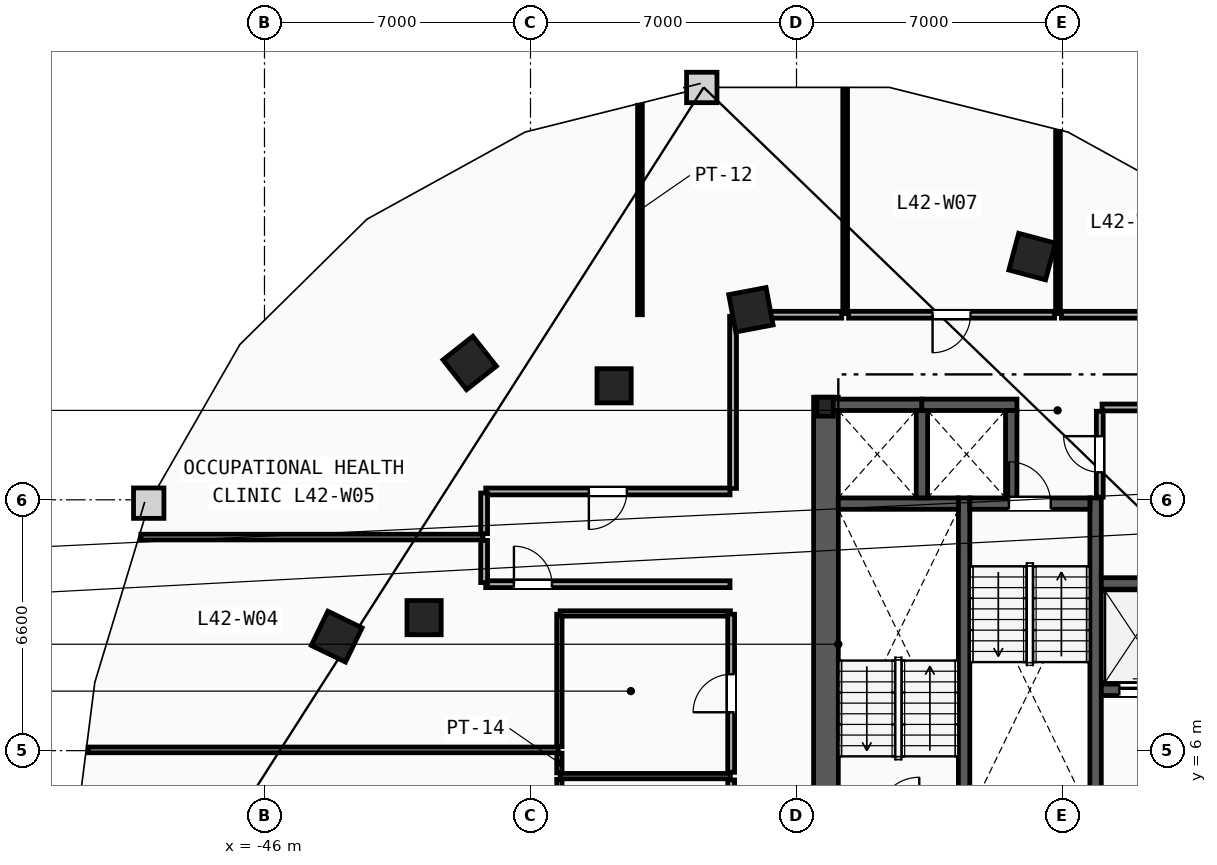
"""IFC4 building model, lengths in metres.
Left out: names, types, materials, properties, quantities, classifications, styles, units other than length and angle.
Written with IfcOpenShell. Run it as: python <this file> out.ifc"""

import sys

from ifc_helpers import new_model, si_unit, direction, frame, frame_2d, origin, origin_2d, place, context, subcontext, project, spatial, rectangle, i_section, extrude, element, fill, save


model = new_model("IFC4")
c1 = context("Model", 3, precision=1e-05, world=origin(), true_north=direction((0.0, 1.0)))
c2 = subcontext(c1, "Body", "Model", "MODEL_VIEW")
j1 = project(units=[si_unit("LENGTHUNIT", "METRE"), si_unit("PLANEANGLEUNIT", "RADIAN")], contexts=[c1])
p1 = place(None, origin())
s1 = spatial("IfcSite", under=j1, at=p1, CompositionType="ELEMENT")
p2 = place(p1, origin())
s2 = spatial("IfcBuilding", under=s1, at=p2, CompositionType="ELEMENT")
p3 = place(p2, frame((0.0, 0.0, 162.0)))
s3 = spatial("IfcBuildingStorey", under=s2, at=p3, CompositionType="ELEMENT", Elevation=162.0)
p4 = place(p3, frame((-31.25, 15.05, 0.0), z_axis=(0.0, 0.0, 1.0), x_axis=(1.0, 0.0, 0.0)))
e1 = element("IfcColumn", 1, at=p4, inside=s3, PredefinedType="COLUMN", context=c2, shape_type="SweptSolid", body=[
    extrude(i_section(OverallWidth=0.432, OverallDepth=0.498, WebThickness=0.056, FlangeThickness=0.089, FilletRadius=0.018, at=origin_2d()), origin(), (0.0, 0.0, 1.0), 3.6),
])
for number, where, z_axis, x_axis in (
    (2, (-41.8, 9.5, 0.0), (0.0, 0.0, 1.0), (1.0, 0.0, 0.0)),
    (3, (-36.8, 15.6, 0.0), (0.0, 0.0, 1.0), (1.0, 0.0, 0.0)),
):
    element("IfcColumn", number, at=place(p3, frame(where, z_axis=z_axis, x_axis=x_axis)), inside=s3, PredefinedType="COLUMN", context=c2, shape_type="SweptSolid", body=[
        extrude(rectangle(XDim=0.9, YDim=0.9, at=origin_2d()), origin(), (0.0, 0.0, 1.0), 3.6),
    ])
for number, where, z_axis, x_axis in (
    (4, (-25.8, 19.0, 0.0), (0.0, 0.0, 1.0), (-0.966, 0.259, 0.0)),
    (5, (-33.2, 17.6, 0.0), (0.0, 0.0, 1.0), (-0.983, -0.186, 0.0)),
    (6, (-40.6, 16.2, 0.0), (0.0, 0.0, 1.0), (-0.785, -0.619, 0.0)),
    (7, (-44.1, 9.0, 0.0), (0.0, 0.0, 1.0), (-0.437, -0.899, 0.0)),
):
    element("IfcColumn", number, at=place(p3, frame(where, z_axis=z_axis, x_axis=x_axis)), inside=s3, PredefinedType="COLUMN", context=c2, shape_type="SweptSolid", body=[
        extrude(rectangle(XDim=1.0, YDim=1.0, at=origin_2d()), origin(), (0.0, 0.0, 1.0), 3.6),
    ])
p5 = place(p3, frame((-31.225, 1.97, 0.0), z_axis=(0.0, 0.0, 1.0), x_axis=(0.0, 1.0, 0.0)))
e8 = element("IfcWall", 8, at=p5, inside=s3, PredefinedType="SHEAR", context=c2, shape_type="SweptSolid", body=[
    extrude(rectangle(XDim=13.33, YDim=0.65, at=frame_2d((6.665, 0.0))), origin(), (0.0, 0.0, 1.0), 3.36),
])
for number, where, z_axis, x_axis in (
    (9, (-27.59, 1.97, 0.0), (0.0, 0.0, 1.0), (0.0, 1.0, 0.0)),
    (10, (-24.13, 1.97, 0.0), (0.0, 0.0, 1.0), (0.0, 1.0, 0.0)),
):
    element("IfcWall", number, at=place(p3, frame(where, z_axis=z_axis, x_axis=x_axis)), inside=s3, PredefinedType="SHEAR", context=c2, shape_type="SweptSolid", body=[
        extrude(rectangle(XDim=10.68, YDim=0.3, at=frame_2d((5.34, 0.0))), origin(), (0.0, 0.0, 1.0), 3.36),
    ])
p6 = place(p3, frame((-30.9, 12.5, 0.0), z_axis=(0.0, 0.0, 1.0), x_axis=(1.0, 0.0, 0.0)))
e11 = element("IfcWall", 11, at=p6, inside=s3, PredefinedType="SHEAR", context=c2, shape_type="SweptSolid", body=[
    extrude(rectangle(XDim=3.16, YDim=0.3, at=frame_2d((1.58, 0.0))), origin(), (0.0, 0.0, 1.0), 3.36),
])
p7 = place(p3, frame((-27.44, 12.5, 0.0), z_axis=(0.0, 0.0, 1.0), x_axis=(1.0, 0.0, 0.0)))
e12 = element("IfcWall", 12, at=p7, inside=s3, PredefinedType="SHEAR", context=c2, shape_type="SweptSolid", body=[
    extrude(rectangle(XDim=3.16, YDim=0.3, at=frame_2d((1.58, 0.0))), origin(), (0.0, 0.0, 1.0), 3.36),
])
p8 = place(p7, frame((1.03, 0.0, 0.0)))
e13 = element("IfcOpeningElement", 13, at=p8, cuts=e12, PredefinedType="OPENING", context=c2, shape_type="SweptSolid", body=[
    extrude(rectangle(XDim=1.1, YDim=2.15, at=frame_2d((0.55, 1.075))), frame((0.0, 0.16, 0.0), z_axis=(0.0, -1.0, 0.0), x_axis=(1.0, 0.0, 0.0)), (0.0, 0.0, 1.0), 0.32),
])
p9 = place(p3, frame((-23.98, 7.6, 0.0), z_axis=(0.0, 0.0, 1.0), x_axis=(1.0, 0.0, 0.0)))
e14 = element("IfcWall", 14, at=p9, inside=s3, PredefinedType="SHEAR", context=c2, shape_type="SweptSolid", body=[
    extrude(rectangle(XDim=2.1, YDim=0.3, at=frame_2d((1.05, 0.0))), origin(), (0.0, 0.0, 1.0), 3.36),
])
p10 = place(p9, frame((0.475, 0.0, 0.0)))
e15 = element("IfcOpeningElement", 15, at=p10, cuts=e14, PredefinedType="OPENING", context=c2, shape_type="SweptSolid", body=[
    extrude(rectangle(XDim=1.15, YDim=2.2, at=frame_2d((0.575, 1.1))), frame((0.0, 0.16, 0.0), z_axis=(0.0, -1.0, 0.0), x_axis=(1.0, 0.0, 0.0)), (0.0, 0.0, 1.0), 0.32),
])
p11 = place(p3, frame((-23.98, 10.4, 0.0), z_axis=(0.0, 0.0, 1.0), x_axis=(1.0, 0.0, 0.0)))
e16 = element("IfcWall", 16, at=p11, inside=s3, PredefinedType="SHEAR", context=c2, shape_type="SweptSolid", body=[
    extrude(rectangle(XDim=2.1, YDim=0.3, at=frame_2d((1.05, 0.0))), origin(), (0.0, 0.0, 1.0), 3.36),
])
p12 = place(p3, frame((-31.2, 15.1, 0.0), z_axis=(0.0, 0.0, 1.0), x_axis=(1.0, 0.0, 0.0)))
e17 = element("IfcWall", 17, at=p12, inside=s3, PredefinedType="SHEAR", context=c2, shape_type="SweptSolid", body=[
    extrude(rectangle(XDim=2.5, YDim=0.3, at=frame_2d((1.25, 0.0))), origin(), (0.0, 0.0, 1.0), 3.36),
])
p13 = place(p3, frame((-28.7, 12.65, 0.0), z_axis=(0.0, 0.0, 1.0), x_axis=(0.0, 1.0, 0.0)))
e18 = element("IfcWall", 18, at=p13, inside=s3, PredefinedType="SHEAR", context=c2, shape_type="SweptSolid", body=[
    extrude(rectangle(XDim=2.3, YDim=0.3, at=frame_2d((1.15, 0.0))), origin(), (0.0, 0.0, 1.0), 3.36),
])
p14 = place(p3, frame((-28.7, 15.1, 0.0), z_axis=(0.0, 0.0, 1.0), x_axis=(1.0, 0.0, 0.0)))
e19 = element("IfcWall", 19, at=p14, inside=s3, PredefinedType="SHEAR", context=c2, shape_type="SweptSolid", body=[
    extrude(rectangle(XDim=2.5, YDim=0.3, at=frame_2d((1.25, 0.0))), origin(), (0.0, 0.0, 1.0), 3.36),
])
p15 = place(p3, frame((-26.35, 12.65, 0.0), z_axis=(0.0, 0.0, 1.0), x_axis=(0.0, 1.0, 0.0)))
e20 = element("IfcWall", 20, at=p15, inside=s3, PredefinedType="SHEAR", context=c2, shape_type="SweptSolid", body=[
    extrude(rectangle(XDim=2.3, YDim=0.3, at=frame_2d((1.15, 0.0))), origin(), (0.0, 0.0, 1.0), 3.36),
])
p16 = place(p3, frame((-23.96, 15.03, 0.0), z_axis=(0.0, 0.0, 1.0), x_axis=(1.0, 0.0, 0.0)))
e21 = element("IfcWall", 21, at=p16, inside=s3, PredefinedType="PARTITIONING", context=c2, shape_type="SweptSolid", body=[
    extrude(rectangle(XDim=2.61, YDim=0.18, at=frame_2d((1.305, 0.0))), origin(), (0.0, 0.0, 1.0), 2.433),
])
p17 = place(p3, frame((-24.02, 12.67, 0.0), z_axis=(0.0, 0.0, 1.0), x_axis=(0.0, 1.0, 0.0)))
e22 = element("IfcWall", 22, at=p17, inside=s3, PredefinedType="PARTITIONING", context=c2, shape_type="SweptSolid", body=[
    extrude(rectangle(XDim=2.26, YDim=0.18, at=frame_2d((1.13, 0.0))), origin(), (0.0, 0.0, 1.0), 3.36),
])
p18 = place(p17, frame((0.655, 0.0, 0.0)))
e23 = element("IfcOpeningElement", 23, at=p18, cuts=e22, PredefinedType="OPENING", context=c2, shape_type="SweptSolid", body=[
    extrude(rectangle(XDim=0.95, YDim=2.1, at=frame_2d((0.475, 1.05))), frame((0.0, 0.1, 0.0), z_axis=(0.0, -1.0, 0.0), x_axis=(1.0, 0.0, 0.0)), (0.0, 0.0, 1.0), 0.2),
])
p19 = place(p3, frame((-38.24, 0.97, 0.0), z_axis=(0.0, 0.0, 1.0), x_axis=(0.0, 1.0, 0.0)))
e24 = element("IfcWall", 24, at=p19, inside=s3, PredefinedType="PARTITIONING", context=c2, shape_type="SweptSolid", body=[
    extrude(rectangle(XDim=4.275, YDim=0.14, at=frame_2d((2.138, 0.0))), origin(), (0.0, 0.0, 1.0), 3.36),
])
p20 = place(p3, frame((-38.24, 5.415, 0.0), z_axis=(0.0, 0.0, 1.0), x_axis=(0.0, 1.0, 0.0)))
e25 = element("IfcWall", 25, at=p20, inside=s3, PredefinedType="PARTITIONING", context=c2, shape_type="SweptSolid", body=[
    extrude(rectangle(XDim=0.52, YDim=0.14, at=frame_2d((0.26, 0.0))), origin(), (0.0, 0.0, 1.0), 3.36),
])
p21 = place(p3, frame((-38.24, 6.105, 0.0), z_axis=(0.0, 0.0, 1.0), x_axis=(0.0, 1.0, 0.0)))
e26 = element("IfcWall", 26, at=p21, inside=s3, PredefinedType="PARTITIONING", context=c2, shape_type="SweptSolid", body=[
    extrude(rectangle(XDim=3.485, YDim=0.14, at=frame_2d((1.743, 0.0))), origin(), (0.0, 0.0, 1.0), 3.36),
])
for number, where, z_axis, x_axis in (
    (27, (-38.22, 5.33, 0.0), (0.0, 0.0, 1.0), (1.0, 0.0, 0.0)),
    (28, (-38.22, 9.61, 0.0), (0.0, 0.0, 1.0), (1.0, 0.0, 0.0)),
):
    element("IfcWall", number, at=place(p3, frame(where, z_axis=z_axis, x_axis=x_axis)), inside=s3, PredefinedType="PARTITIONING", context=c2, shape_type="SweptSolid", body=[
        extrude(rectangle(XDim=4.48, YDim=0.14, at=frame_2d((2.24, 0.0))), origin(), (0.0, 0.0, 1.0), 3.36),
    ])
p22 = place(p3, frame((-33.72, 0.97, 0.0), z_axis=(0.0, 0.0, 1.0), x_axis=(0.0, 1.0, 0.0)))
e29 = element("IfcWall", 29, at=p22, inside=s3, PredefinedType="PARTITIONING", context=c2, shape_type="SweptSolid", body=[
    extrude(rectangle(XDim=4.26, YDim=0.18, at=frame_2d((2.13, 0.0))), origin(), (0.0, 0.0, 1.0), 3.36),
])
p23 = place(p22, frame((1.655, 0.0, 0.0)))
e30 = element("IfcOpeningElement", 30, at=p23, cuts=e29, PredefinedType="OPENING", context=c2, shape_type="SweptSolid", body=[
    extrude(rectangle(XDim=0.95, YDim=2.1, at=frame_2d((0.475, 1.05))), frame((0.0, 0.1, 0.0), z_axis=(0.0, -1.0, 0.0), x_axis=(1.0, 0.0, 0.0)), (0.0, 0.0, 1.0), 0.2),
])
p24 = place(p3, frame((-33.72, 5.43, 0.0), z_axis=(0.0, 0.0, 1.0), x_axis=(0.0, 1.0, 0.0)))
e31 = element("IfcWall", 31, at=p24, inside=s3, PredefinedType="PARTITIONING", context=c2, shape_type="SweptSolid", body=[
    extrude(rectangle(XDim=4.16, YDim=0.18, at=frame_2d((2.08, 0.0))), origin(), (0.0, 0.0, 1.0), 3.36),
])
p25 = place(p24, frame((1.58, 0.0, 0.0)))
e32 = element("IfcOpeningElement", 32, at=p25, cuts=e31, PredefinedType="OPENING", context=c2, shape_type="SweptSolid", body=[
    extrude(rectangle(XDim=1.0, YDim=2.15, at=frame_2d((0.5, 1.075))), frame((0.0, 0.1, 0.0), z_axis=(0.0, -1.0, 0.0), x_axis=(1.0, 0.0, 0.0)), (0.0, 0.0, 1.0), 0.2),
])
p26 = place(p3, frame((-50.641, 6.02, 0.0), z_axis=(0.0, 0.0, 1.0), x_axis=(1.0, 0.0, 0.0)))
e33 = element("IfcWall", 33, at=p26, inside=s3, PredefinedType="PARTITIONING", context=c2, shape_type="SweptSolid", body=[
    extrude(rectangle(XDim=12.371, YDim=0.15, at=frame_2d((6.186, 0.0))), origin(), (0.0, 0.0, 1.0), 3.36),
])
p27 = place(p3, frame((-49.254, 11.62, 0.0), z_axis=(0.0, 0.0, 1.0), x_axis=(1.0, 0.0, 0.0)))
e34 = element("IfcWall", 34, at=p27, inside=s3, PredefinedType="PARTITIONING", context=c2, shape_type="SweptSolid", body=[
    extrude(rectangle(XDim=9.004, YDim=0.15, at=frame_2d((4.502, 0.0))), origin(), (0.0, 0.0, 1.0), 3.36),
])
p28 = place(p3, frame((-36.12, 17.47, 0.0), z_axis=(0.0, 0.0, 1.0), x_axis=(0.0, 1.0, 0.0)))
e35 = element("IfcWall", 35, at=p28, inside=s3, PredefinedType="PARTITIONING", context=c2, shape_type="SweptSolid", body=[
    extrude(rectangle(XDim=5.511, YDim=0.125, at=frame_2d((2.756, 0.0))), origin(), (0.0, 0.0, 1.0), 3.36),
])
p29 = place(p3, frame((-30.72, 17.5, 0.0), z_axis=(0.0, 0.0, 1.0), x_axis=(0.0, 1.0, 0.0)))
e36 = element("IfcWall", 36, at=p29, inside=s3, PredefinedType="PARTITIONING", context=c2, shape_type="SweptSolid", body=[
    extrude(rectangle(XDim=5.902, YDim=0.125, at=frame_2d((2.951, 0.0))), origin(), (0.0, 0.0, 1.0), 3.36),
])
p30 = place(p3, frame((-25.12, 17.5, 0.0), z_axis=(0.0, 0.0, 1.0), x_axis=(0.0, 1.0, 0.0)))
e37 = element("IfcWall", 37, at=p30, inside=s3, PredefinedType="PARTITIONING", context=c2, shape_type="SweptSolid", body=[
    extrude(rectangle(XDim=4.791, YDim=0.125, at=frame_2d((2.396, 0.0))), origin(), (0.0, 0.0, 1.0), 3.36),
])
p31 = place(p3, frame((-40.178, 10.38, 0.0), z_axis=(0.0, 0.0, 1.0), x_axis=(1.0, 0.0, 0.0)))
e38 = element("IfcWall", 38, at=p31, inside=s3, PredefinedType="PARTITIONING", context=c2, shape_type="SweptSolid", body=[
    extrude(rectangle(XDim=6.428, YDim=0.18, at=frame_2d((3.214, 0.0))), origin(), (0.0, 0.0, 1.0), 3.36),
])
p32 = place(p31, frame((0.743, 0.0, 0.0)))
e39 = element("IfcOpeningElement", 39, at=p32, cuts=e38, PredefinedType="OPENING", context=c2, shape_type="SweptSolid", body=[
    extrude(rectangle(XDim=1.0, YDim=2.15, at=frame_2d((0.5, 1.075))), frame((0.0, 0.1, 0.0), z_axis=(0.0, -1.0, 0.0), x_axis=(1.0, 0.0, 0.0)), (0.0, 0.0, 1.0), 0.2),
])
p33 = place(p3, frame((-40.22, 11.53, 0.0), z_axis=(0.0, 0.0, 1.0), x_axis=(0.0, -1.0, 0.0)))
e40 = element("IfcWall", 40, at=p33, inside=s3, PredefinedType="PARTITIONING", context=c2, shape_type="SweptSolid", body=[
    extrude(rectangle(XDim=1.109, YDim=0.18, at=frame_2d((0.554, 0.0))), origin(), (0.0, 0.0, 1.0), 3.36),
])
p34 = place(p3, frame((-33.75, 12.82, 0.0), z_axis=(0.0, 0.0, 1.0), x_axis=(-1.0, 0.0, 0.0)))
e41 = element("IfcWall", 41, at=p34, inside=s3, PredefinedType="PARTITIONING", context=c2, shape_type="SweptSolid", body=[
    extrude(rectangle(XDim=6.428, YDim=0.18, at=frame_2d((3.214, 0.0))), origin(), (0.0, 0.0, 1.0), 3.36),
])
p35 = place(p34, frame((2.714, 0.0, 0.0)))
e42 = element("IfcOpeningElement", 42, at=p35, cuts=e41, PredefinedType="OPENING", context=c2, shape_type="SweptSolid", body=[
    extrude(rectangle(XDim=1.0, YDim=2.15, at=frame_2d((0.5, 1.075))), frame((0.0, 0.1, 0.0), z_axis=(0.0, -1.0, 0.0), x_axis=(1.0, 0.0, 0.0)), (0.0, 0.0, 1.0), 0.2),
])
p36 = place(p3, frame((-33.67, 17.428, 0.0), z_axis=(0.0, 0.0, 1.0), x_axis=(0.0, -1.0, 0.0)))
e43 = element("IfcWall", 43, at=p36, inside=s3, PredefinedType="PARTITIONING", context=c2, shape_type="SweptSolid", body=[
    extrude(rectangle(XDim=4.529, YDim=0.18, at=frame_2d((2.264, 0.0))), origin(), (0.0, 0.0, 1.0), 3.36),
])
p37 = place(p3, frame((-30.81, 17.47, 0.0), z_axis=(0.0, 0.0, 1.0), x_axis=(-1.0, 0.0, 0.0)))
e44 = element("IfcWall", 44, at=p37, inside=s3, PredefinedType="PARTITIONING", context=c2, shape_type="SweptSolid", body=[
    extrude(rectangle(XDim=2.818, YDim=0.18, at=frame_2d((1.409, 0.0))), origin(), (0.0, 0.0, 1.0), 3.36),
])
p38 = place(p3, frame((-40.22, 12.779, 0.0), z_axis=(0.0, 0.0, 1.0), x_axis=(0.0, -1.0, 0.0)))
e45 = element("IfcWall", 45, at=p38, inside=s3, PredefinedType="PARTITIONING", context=c2, shape_type="SweptSolid", body=[
    extrude(rectangle(XDim=1.069, YDim=0.18, at=frame_2d((0.534, 0.0))), origin(), (0.0, 0.0, 1.0), 3.36),
])
p39 = place(p3, frame((-18.342, 17.47, 0.0), z_axis=(0.0, 0.0, 1.0), x_axis=(-1.0, 0.0, 0.0)))
e46 = element("IfcWall", 46, at=p39, inside=s3, PredefinedType="PARTITIONING", context=c2, shape_type="SweptSolid", body=[
    extrude(rectangle(XDim=6.688, YDim=0.18, at=frame_2d((3.344, 0.0))), origin(), (0.0, 0.0, 1.0), 3.36),
])
p40 = place(p39, frame((2.844, 0.0, 0.0)))
e47 = element("IfcOpeningElement", 47, at=p40, cuts=e46, PredefinedType="OPENING", context=c2, shape_type="SweptSolid", body=[
    extrude(rectangle(XDim=1.0, YDim=2.15, at=frame_2d((0.5, 1.075))), frame((0.0, 0.1, 0.0), z_axis=(0.0, -1.0, 0.0), x_axis=(1.0, 0.0, 0.0)), (0.0, 0.0, 1.0), 0.2),
])
p41 = place(p3, frame((-25.21, 17.47, 0.0), z_axis=(0.0, 0.0, 1.0), x_axis=(-1.0, 0.0, 0.0)))
e48 = element("IfcWall", 48, at=p41, inside=s3, PredefinedType="PARTITIONING", context=c2, shape_type="SweptSolid", body=[
    extrude(rectangle(XDim=5.42, YDim=0.18, at=frame_2d((2.71, 0.0))), origin(), (0.0, 0.0, 1.0), 3.36),
])
p42 = place(p41, frame((2.21, 0.0, 0.0)))
e49 = element("IfcOpeningElement", 49, at=p42, cuts=e48, PredefinedType="OPENING", context=c2, shape_type="SweptSolid", body=[
    extrude(rectangle(XDim=1.0, YDim=2.15, at=frame_2d((0.5, 1.075))), frame((0.0, 0.1, 0.0), z_axis=(0.0, -1.0, 0.0), x_axis=(1.0, 0.0, 0.0)), (0.0, 0.0, 1.0), 0.2),
])
p43 = place(p8, origin())
e50 = element("IfcDoor", 50, at=p43, inside=s3, OperationType="SINGLE_SWING_LEFT", PredefinedType="DOOR", context=c2, shape_type="SweptSolid", body=[
    extrude(rectangle(XDim=1.1, YDim=2.15, at=frame_2d((0.55, 1.075))), frame((0.0, 0.025, 0.0), z_axis=(0.0, -1.0, 0.0), x_axis=(1.0, 0.0, 0.0)), (0.0, 0.0, 1.0), 0.05),
])
fill(e13, e50)
p44 = place(p10, origin())
e51 = element("IfcDoor", 51, at=p44, inside=s3, OperationType="SLIDING_TO_LEFT", PredefinedType="TRAPDOOR", context=c2, shape_type="SweptSolid", body=[
    extrude(rectangle(XDim=1.15, YDim=2.2, at=frame_2d((0.575, 1.1))), frame((0.0, 0.025, 0.0), z_axis=(0.0, -1.0, 0.0), x_axis=(1.0, 0.0, 0.0)), (0.0, 0.0, 1.0), 0.05),
])
fill(e15, e51)
p45 = place(p32, origin())
e52 = element("IfcDoor", 52, at=p45, inside=s3, OperationType="SINGLE_SWING_LEFT", PredefinedType="DOOR", context=c2, shape_type="SweptSolid", body=[
    extrude(rectangle(XDim=1.0, YDim=2.15, at=frame_2d((0.5, 1.075))), frame((0.0, 0.025, 0.0), z_axis=(0.0, -1.0, 0.0), x_axis=(1.0, 0.0, 0.0)), (0.0, 0.0, 1.0), 0.05),
])
fill(e39, e52)
p46 = place(p35, origin())
e53 = element("IfcDoor", 53, at=p46, inside=s3, OperationType="SINGLE_SWING_RIGHT", PredefinedType="DOOR", context=c2, shape_type="SweptSolid", body=[
    extrude(rectangle(XDim=1.0, YDim=2.15, at=frame_2d((0.5, 1.075))), frame((0.0, 0.025, 0.0), z_axis=(0.0, -1.0, 0.0), x_axis=(1.0, 0.0, 0.0)), (0.0, 0.0, 1.0), 0.05),
])
fill(e42, e53)
p47 = place(p42, origin())
e54 = element("IfcDoor", 54, at=p47, inside=s3, OperationType="SINGLE_SWING_RIGHT", PredefinedType="DOOR", context=c2, shape_type="SweptSolid", body=[
    extrude(rectangle(XDim=1.0, YDim=2.15, at=frame_2d((0.5, 1.075))), frame((0.0, 0.025, 0.0), z_axis=(0.0, -1.0, 0.0), x_axis=(1.0, 0.0, 0.0)), (0.0, 0.0, 1.0), 0.05),
])
fill(e49, e54)
p48 = place(p25, origin())
e55 = element("IfcDoor", 55, at=p48, inside=s3, OperationType="SINGLE_SWING_LEFT", PredefinedType="DOOR", context=c2, shape_type="SweptSolid", body=[
    extrude(rectangle(XDim=1.0, YDim=2.15, at=frame_2d((0.5, 1.075))), frame((0.0, 0.025, 0.0), z_axis=(0.0, -1.0, 0.0), x_axis=(1.0, 0.0, 0.0)), (0.0, 0.0, 1.0), 0.05),
])
fill(e32, e55)
p49 = place(p18, origin())
e56 = element("IfcDoor", 56, at=p49, inside=s3, OperationType="SINGLE_SWING_RIGHT", PredefinedType="DOOR", context=c2, shape_type="SweptSolid", body=[
    extrude(rectangle(XDim=0.95, YDim=2.1, at=frame_2d((0.475, 1.05))), frame((0.0, 0.025, 0.0), z_axis=(0.0, -1.0, 0.0), x_axis=(1.0, 0.0, 0.0)), (0.0, 0.0, 1.0), 0.05),
])
fill(e23, e56)
save(model, sys.argv[1])
